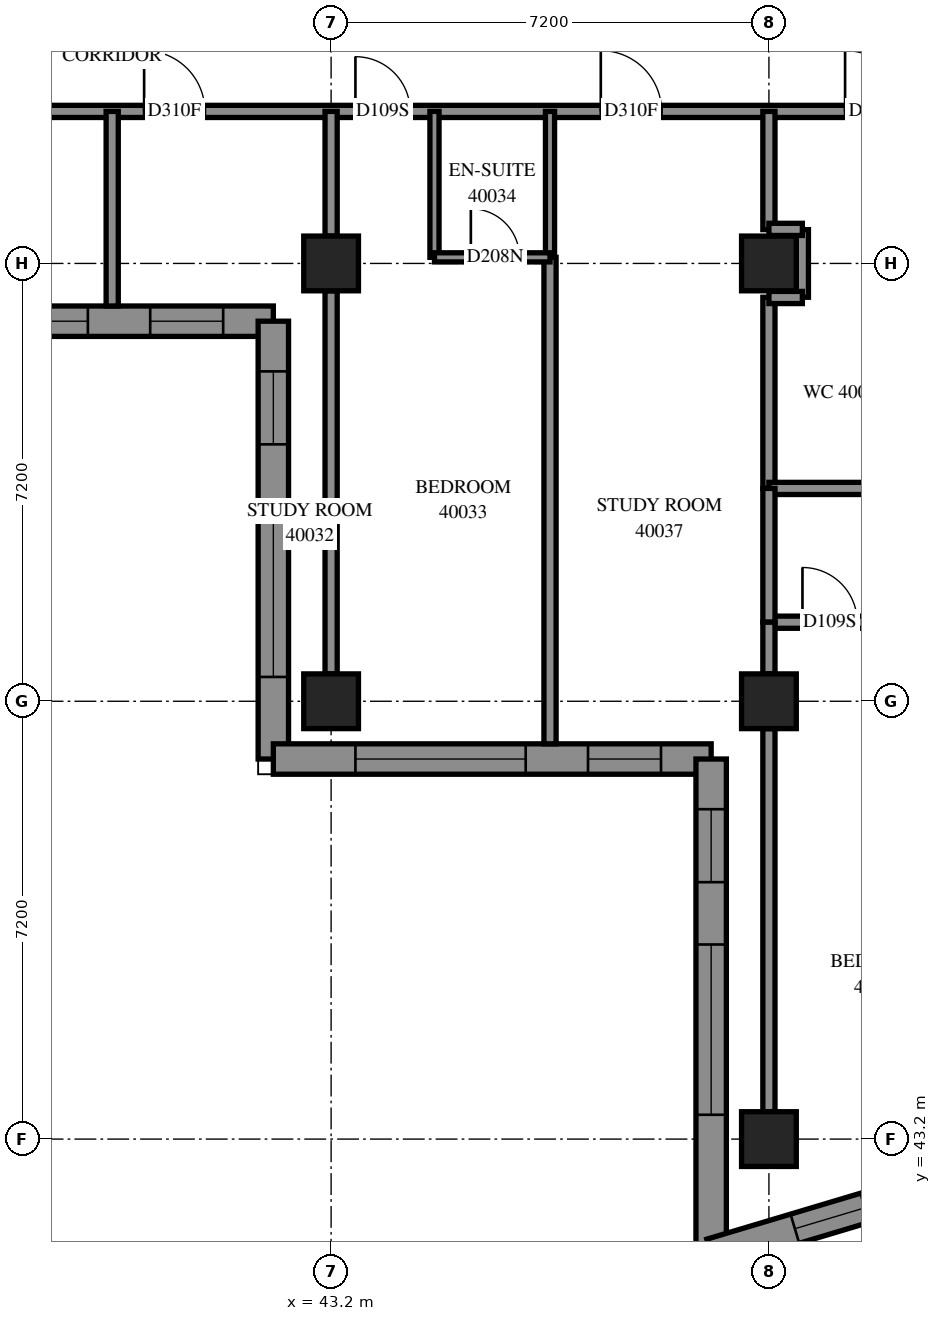
"""IFC4 building model, lengths in metres.
Left out: names, types, materials, properties, quantities, classifications, styles, units other than length and angle.
Written with IfcOpenShell. Run it as: python <this file> out.ifc"""

import sys

from ifc_helpers import new_model, si_unit, direction, frame, frame_2d, origin, origin_2d, place, context, subcontext, project, spatial, polyline, rectangle, outline, extrude, element, fill, save


model = new_model("IFC4")
c1 = context("Model", 3, precision=1e-05, world=origin(), true_north=direction((0.0, 1.0)))
c2 = subcontext(c1, "Body", "Model", "MODEL_VIEW")
j1 = project(units=[si_unit("LENGTHUNIT", "METRE"), si_unit("PLANEANGLEUNIT", "RADIAN")], contexts=[c1])
p1 = place(None, origin())
s1 = spatial("IfcSite", under=j1, at=p1, CompositionType="ELEMENT")
p2 = place(p1, origin())
s2 = spatial("IfcBuilding", under=s1, at=p2, CompositionType="ELEMENT")
p3 = place(p2, frame((0.0, 0.0, 149.0)))
s3 = spatial("IfcBuildingStorey", under=s2, at=p3, CompositionType="ELEMENT", Elevation=149.0)
for number, where, z_axis, x_axis in (
    (1, (43.2, 50.4, 0.0), (0.0, 0.0, 1.0), (1.0, 0.0, 0.0)),
    (2, (43.2, 57.6, 0.0), (0.0, 0.0, 1.0), (1.0, 0.0, 0.0)),
    (3, (50.4, 43.2, 0.0), (0.0, 0.0, 1.0), (1.0, 0.0, 0.0)),
    (4, (50.4, 50.4, 0.0), (0.0, 0.0, 1.0), (1.0, 0.0, 0.0)),
    (5, (50.4, 57.6, 0.0), (0.0, 0.0, 1.0), (1.0, 0.0, 0.0)),
):
    element("IfcColumn", number, at=place(p3, frame(where, z_axis=z_axis, x_axis=x_axis)), inside=s3, PredefinedType="COLUMN", context=c2, shape_type="SweptSolid", body=[
        extrude(rectangle(XDim=0.9, YDim=0.9, at=origin_2d()), origin(), (0.0, 0.0, 1.0), 3.1),
    ])
p4 = place(p3, frame((35.05, 56.65, 0.0), z_axis=(0.0, 0.0, 1.0), x_axis=(1.0, 0.0, 0.0)))
e6 = element("IfcWall", 6, at=p4, inside=s3, PredefinedType="SOLIDWALL", context=c2, shape_type="SweptSolid", body=[
    extrude(outline(polyline([(-0.25, -0.25), (6.95, -0.25), (7.45, 0.25), (0.25, 0.25), (-0.25, -0.25)])), origin(), (0.0, 0.0, 1.0), 3.1),
])
p5 = place(p4, frame((1.35, 0.0, 0.45)))
e7 = element("IfcOpeningElement", 7, at=p5, cuts=e6, PredefinedType="OPENING", context=c2, shape_type="SweptSolid", body=[
    extrude(rectangle(XDim=2.8, YDim=2.5, at=frame_2d((1.4, 1.25))), frame((0.0, 0.26, 0.0), z_axis=(0.0, -1.0, 0.0), x_axis=(1.0, 0.0, 0.0)), (0.0, 0.0, 1.0), 0.52),
])
p6 = place(p4, frame((5.175, 0.0, 0.45)))
e8 = element("IfcOpeningElement", 8, at=p6, cuts=e6, PredefinedType="OPENING", context=c2, shape_type="SweptSolid", body=[
    extrude(rectangle(XDim=1.2, YDim=2.5, at=frame_2d((0.6, 1.25))), frame((0.0, 0.26, 0.0), z_axis=(0.0, -1.0, 0.0), x_axis=(1.0, 0.0, 0.0)), (0.0, 0.0, 1.0), 0.52),
])
p7 = place(p3, frame((42.25, 56.65, 0.0), z_axis=(0.0, 0.0, 1.0), x_axis=(0.0, -1.0, 0.0)))
e9 = element("IfcWall", 9, at=p7, inside=s3, PredefinedType="SOLIDWALL", context=c2, shape_type="SweptSolid", body=[
    extrude(outline(polyline([(0.25, -0.25), (7.45, -0.25), (6.95, 0.25), (-0.25, 0.25), (0.25, -0.25)])), origin(), (0.0, 0.0, 1.0), 3.1),
])
p8 = place(p7, frame((3.05, 0.0, 0.45)))
e10 = element("IfcOpeningElement", 10, at=p8, cuts=e9, PredefinedType="OPENING", context=c2, shape_type="SweptSolid", body=[
    extrude(rectangle(XDim=2.8, YDim=2.5, at=frame_2d((1.4, 1.25))), frame((0.0, 0.26, 0.0), z_axis=(0.0, -1.0, 0.0), x_axis=(1.0, 0.0, 0.0)), (0.0, 0.0, 1.0), 0.52),
])
p9 = place(p7, frame((0.825, 0.0, 0.45)))
e11 = element("IfcOpeningElement", 11, at=p9, cuts=e9, PredefinedType="OPENING", context=c2, shape_type="SweptSolid", body=[
    extrude(rectangle(XDim=1.2, YDim=2.5, at=frame_2d((0.6, 1.25))), frame((0.0, 0.26, 0.0), z_axis=(0.0, -1.0, 0.0), x_axis=(1.0, 0.0, 0.0)), (0.0, 0.0, 1.0), 0.52),
])
p10 = place(p3, frame((42.25, 49.45, 0.0), z_axis=(0.0, 0.0, 1.0), x_axis=(1.0, 0.0, 0.0)))
e12 = element("IfcWall", 12, at=p10, inside=s3, PredefinedType="SOLIDWALL", context=c2, shape_type="SweptSolid", body=[
    extrude(outline(polyline([(-0.25, -0.25), (6.95, -0.25), (7.45, 0.25), (0.25, 0.25), (-0.25, -0.25)])), origin(), (0.0, 0.0, 1.0), 3.1),
])
p11 = place(p10, frame((1.35, 0.0, 0.45)))
e13 = element("IfcOpeningElement", 13, at=p11, cuts=e12, PredefinedType="OPENING", context=c2, shape_type="SweptSolid", body=[
    extrude(rectangle(XDim=2.8, YDim=2.5, at=frame_2d((1.4, 1.25))), frame((0.0, 0.26, 0.0), z_axis=(0.0, -1.0, 0.0), x_axis=(1.0, 0.0, 0.0)), (0.0, 0.0, 1.0), 0.52),
])
p12 = place(p10, frame((5.175, 0.0, 0.45)))
e14 = element("IfcOpeningElement", 14, at=p12, cuts=e12, PredefinedType="OPENING", context=c2, shape_type="SweptSolid", body=[
    extrude(rectangle(XDim=1.2, YDim=2.5, at=frame_2d((0.6, 1.25))), frame((0.0, 0.26, 0.0), z_axis=(0.0, -1.0, 0.0), x_axis=(1.0, 0.0, 0.0)), (0.0, 0.0, 1.0), 0.52),
])
p13 = place(p3, frame((49.45, 49.45, 0.0), z_axis=(0.0, 0.0, 1.0), x_axis=(0.0, -1.0, 0.0)))
e15 = element("IfcWall", 15, at=p13, inside=s3, PredefinedType="SOLIDWALL", context=c2, shape_type="SweptSolid", body=[
    extrude(outline(polyline([(0.25, -0.25), (8.471, -0.25), (7.8, 0.25), (-0.25, 0.25), (0.25, -0.25)])), origin(), (0.0, 0.0, 1.0), 3.1),
])
p14 = place(p13, frame((3.05, 0.0, 0.45)))
e16 = element("IfcOpeningElement", 16, at=p14, cuts=e15, PredefinedType="OPENING", context=c2, shape_type="SweptSolid", body=[
    extrude(rectangle(XDim=2.8, YDim=2.5, at=frame_2d((1.4, 1.25))), frame((0.0, 0.26, 0.0), z_axis=(0.0, -1.0, 0.0), x_axis=(1.0, 0.0, 0.0)), (0.0, 0.0, 1.0), 0.52),
])
p15 = place(p13, frame((0.825, 0.0, 0.45)))
e17 = element("IfcOpeningElement", 17, at=p15, cuts=e15, PredefinedType="OPENING", context=c2, shape_type="SweptSolid", body=[
    extrude(rectangle(XDim=1.2, YDim=2.5, at=frame_2d((0.6, 1.25))), frame((0.0, 0.26, 0.0), z_axis=(0.0, -1.0, 0.0), x_axis=(1.0, 0.0, 0.0)), (0.0, 0.0, 1.0), 0.52),
])
p16 = place(p3, frame((49.45, 41.315, 0.0), z_axis=(0.0, 0.0, 1.0), x_axis=(0.9581326082, 0.2863248246, 0.0)))
e18 = element("IfcWall", 18, at=p16, inside=s3, PredefinedType="SOLIDWALL", context=c2, shape_type="SweptSolid", body=[
    extrude(outline(polyline([(-0.336, -0.25), (3.23, -0.25), (3.335, 0.25), (0.336, 0.25), (-0.336, -0.25)])), origin(), (0.0, 0.0, 1.0), 3.1),
])
p17 = place(p16, frame((1.437, 0.0, 0.45)))
e19 = element("IfcOpeningElement", 19, at=p17, cuts=e18, PredefinedType="OPENING", context=c2, shape_type="SweptSolid", body=[
    extrude(rectangle(XDim=1.2, YDim=2.5, at=frame_2d((0.6, 1.25))), frame((0.0, 0.26, 0.0), z_axis=(0.0, -1.0, 0.0), x_axis=(1.0, 0.0, 0.0)), (0.0, 0.0, 1.0), 0.52),
])
p18 = place(p3, frame((36.0, 60.1, 0.0), z_axis=(0.0, 0.0, 1.0), x_axis=(1.0, 0.0, 0.0)))
e20 = element("IfcWall", 20, at=p18, inside=s3, PredefinedType="PARTITIONING", context=c2, shape_type="SweptSolid", body=[
    extrude(rectangle(XDim=16.9, YDim=0.2, at=frame_2d((8.45, 0.0))), origin(), (0.0, 0.0, 1.0), 3.1),
])
p19 = place(p18, frame((4.125, 0.0, 0.0)))
e21 = element("IfcOpeningElement", 21, at=p19, cuts=e20, PredefinedType="OPENING", context=c2, shape_type="SweptSolid", body=[
    extrude(rectangle(XDim=1.0, YDim=2.1, at=frame_2d((0.5, 1.05))), frame((0.0, 0.11, 0.0), z_axis=(0.0, -1.0, 0.0), x_axis=(1.0, 0.0, 0.0)), (0.0, 0.0, 1.0), 0.22),
])
p20 = place(p18, frame((7.6, 0.0, 0.0)))
e22 = element("IfcOpeningElement", 22, at=p20, cuts=e20, PredefinedType="OPENING", context=c2, shape_type="SweptSolid", body=[
    extrude(rectangle(XDim=0.9, YDim=2.1, at=frame_2d((0.45, 1.05))), frame((0.0, 0.11, 0.0), z_axis=(0.0, -1.0, 0.0), x_axis=(1.0, 0.0, 0.0)), (0.0, 0.0, 1.0), 0.22),
])
p21 = place(p18, frame((11.635, 0.0, 0.0)))
e23 = element("IfcOpeningElement", 23, at=p21, cuts=e20, PredefinedType="OPENING", context=c2, shape_type="SweptSolid", body=[
    extrude(rectangle(XDim=1.0, YDim=2.1, at=frame_2d((0.5, 1.05))), frame((0.0, 0.11, 0.0), z_axis=(0.0, -1.0, 0.0), x_axis=(1.0, 0.0, 0.0)), (0.0, 0.0, 1.0), 0.22),
])
p22 = place(p18, frame((15.652, 0.0, 0.0)))
e24 = element("IfcOpeningElement", 24, at=p22, cuts=e20, PredefinedType="OPENING", context=c2, shape_type="SweptSolid", body=[
    extrude(rectangle(XDim=1.0, YDim=2.1, at=frame_2d((0.5, 1.05))), frame((0.0, 0.11, 0.0), z_axis=(0.0, -1.0, 0.0), x_axis=(1.0, 0.0, 0.0)), (0.0, 0.0, 1.0), 0.22),
])
p23 = place(p3, frame((46.8, 49.7, 0.0), z_axis=(0.0, 0.0, 1.0), x_axis=(0.0, 1.0, 0.0)))
e25 = element("IfcWall", 25, at=p23, inside=s3, PredefinedType="PARTITIONING", context=c2, shape_type="SweptSolid", body=[
    extrude(rectangle(XDim=8.0, YDim=0.2, at=frame_2d((4.0, 0.0))), origin(), (0.0, 0.0, 1.0), 3.1),
])
for number, where, z_axis, x_axis in (
    (26, (50.4, 43.65, 0.0), (0.0, 0.0, 1.0), (0.0, 1.0, 0.0)),
    (27, (43.2, 50.85, 0.0), (0.0, 0.0, 1.0), (0.0, 1.0, 0.0)),
):
    element("IfcWall", number, at=place(p3, frame(where, z_axis=z_axis, x_axis=x_axis)), inside=s3, PredefinedType="PARTITIONING", context=c2, shape_type="SweptSolid", body=[
        extrude(rectangle(XDim=6.3, YDim=0.2, at=frame_2d((3.15, 0.0))), origin(), (0.0, 0.0, 1.0), 2.6),
    ])
p24 = place(p3, frame((50.4, 51.7, 0.0), z_axis=(0.0, 0.0, 1.0), x_axis=(1.0, 0.0, 0.0)))
e28 = element("IfcWall", 28, at=p24, inside=s3, PredefinedType="PARTITIONING", context=c2, shape_type="SweptSolid", body=[
    extrude(rectangle(XDim=5.1, YDim=0.2, at=frame_2d((2.55, 0.0))), origin(), (0.0, 0.0, 1.0), 3.1),
])
p25 = place(p24, frame((0.552, 0.0, 0.0)))
e29 = element("IfcOpeningElement", 29, at=p25, cuts=e28, PredefinedType="OPENING", context=c2, shape_type="SweptSolid", body=[
    extrude(rectangle(XDim=0.9, YDim=2.1, at=frame_2d((0.45, 1.05))), frame((0.0, 0.11, 0.0), z_axis=(0.0, -1.0, 0.0), x_axis=(1.0, 0.0, 0.0)), (0.0, 0.0, 1.0), 0.22),
])
p26 = place(p24, frame((3.976, 0.0, 0.0)))
e30 = element("IfcOpeningElement", 30, at=p26, cuts=e28, PredefinedType="OPENING", context=c2, shape_type="SweptSolid", body=[
    extrude(rectangle(XDim=1.0, YDim=2.1, at=frame_2d((0.5, 1.05))), frame((0.0, 0.11, 0.0), z_axis=(0.0, -1.0, 0.0), x_axis=(1.0, 0.0, 0.0)), (0.0, 0.0, 1.0), 0.22),
])
p27 = place(p3, frame((39.6, 56.9, 0.0), z_axis=(0.0, 0.0, 1.0), x_axis=(0.0, 1.0, 0.0)))
e31 = element("IfcWall", 31, at=p27, inside=s3, PredefinedType="PARTITIONING", context=c2, shape_type="SweptSolid", body=[
    extrude(rectangle(XDim=3.2, YDim=0.2, at=frame_2d((1.6, 0.0))), origin(), (0.0, 0.0, 1.0), 3.1),
])
p28 = place(p3, frame((50.4, 53.9, 0.0), z_axis=(0.0, 0.0, 1.0), x_axis=(0.0, 1.0, 0.0)))
e32 = element("IfcWall", 32, at=p28, inside=s3, PredefinedType="PARTITIONING", context=c2, shape_type="SweptSolid", body=[
    extrude(rectangle(XDim=3.144, YDim=0.2, at=frame_2d((1.572, 0.0))), origin(), (0.0, 0.0, 1.0), 3.1),
])
p29 = place(p3, frame((50.4, 53.9, 0.0), z_axis=(0.0, 0.0, 1.0), x_axis=(1.0, 0.0, 0.0)))
e33 = element("IfcWall", 33, at=p29, inside=s3, PredefinedType="PARTITIONING", context=c2, shape_type="SweptSolid", body=[
    extrude(rectangle(XDim=2.5, YDim=0.2, at=frame_2d((1.25, 0.0))), origin(), (0.0, 0.0, 1.0), 3.1),
])
for number, where, z_axis, x_axis in (
    (34, (44.9, 57.7, 0.0), (0.0, 0.0, 1.0), (0.0, 1.0, 0.0)),
    (35, (46.8, 57.7, 0.0), (0.0, 0.0, 1.0), (0.0, 1.0, 0.0)),
):
    element("IfcWall", number, at=place(p3, frame(where, z_axis=z_axis, x_axis=x_axis)), inside=s3, PredefinedType="PARTITIONING", context=c2, shape_type="SweptSolid", body=[
        extrude(rectangle(XDim=2.4, YDim=0.15, at=frame_2d((1.2, 0.0))), origin(), (0.0, 0.0, 1.0), 3.1),
    ])
p30 = place(p3, frame((50.4, 51.7, 0.0), z_axis=(0.0, 0.0, 1.0), x_axis=(0.0, 1.0, 0.0)))
e36 = element("IfcWall", 36, at=p30, inside=s3, PredefinedType="PARTITIONING", context=c2, shape_type="SweptSolid", body=[
    extrude(rectangle(XDim=2.2, YDim=0.2, at=frame_2d((1.1, 0.0))), origin(), (0.0, 0.0, 1.0), 3.1),
])
p31 = place(p3, frame((43.2, 58.05, 0.0), z_axis=(0.0, 0.0, 1.0), x_axis=(0.0, 1.0, 0.0)))
e37 = element("IfcWall", 37, at=p31, inside=s3, PredefinedType="PARTITIONING", context=c2, shape_type="SweptSolid", body=[
    extrude(rectangle(XDim=2.05, YDim=0.2, at=frame_2d((1.025, 0.0))), origin(), (0.0, 0.0, 1.0), 3.1),
])
p32 = place(p3, frame((50.4, 58.156, 0.0), z_axis=(0.0, 0.0, 1.0), x_axis=(0.0, 1.0, 0.0)))
e38 = element("IfcWall", 38, at=p32, inside=s3, PredefinedType="PARTITIONING", context=c2, shape_type="SweptSolid", body=[
    extrude(rectangle(XDim=1.944, YDim=0.2, at=frame_2d((0.972, 0.0))), origin(), (0.0, 0.0, 1.0), 3.1),
])
p33 = place(p3, frame((44.9, 57.7, 0.0), z_axis=(0.0, 0.0, 1.0), x_axis=(1.0, 0.0, 0.0)))
e39 = element("IfcWall", 39, at=p33, inside=s3, PredefinedType="PARTITIONING", context=c2, shape_type="SweptSolid", body=[
    extrude(rectangle(XDim=1.9, YDim=0.15, at=frame_2d((0.95, 0.0))), origin(), (0.0, 0.0, 1.0), 3.1),
])
p34 = place(p33, frame((0.598, 0.0, 0.0)))
e40 = element("IfcOpeningElement", 40, at=p34, cuts=e39, PredefinedType="OPENING", context=c2, shape_type="SweptSolid", body=[
    extrude(rectangle(XDim=0.8, YDim=2.1, at=frame_2d((0.4, 1.05))), frame((0.0, 0.085, 0.0), z_axis=(0.0, -1.0, 0.0), x_axis=(1.0, 0.0, 0.0)), (0.0, 0.0, 1.0), 0.17),
])
p35 = place(p3, frame((50.95, 57.044, 0.0), z_axis=(0.0, 0.0, 1.0), x_axis=(0.0, 1.0, 0.0)))
e41 = element("IfcWall", 41, at=p35, inside=s3, PredefinedType="PARTITIONING", context=c2, shape_type="SweptSolid", body=[
    extrude(rectangle(XDim=1.112, YDim=0.2, at=frame_2d((0.556, 0.0))), origin(), (0.0, 0.0, 1.0), 3.1),
])
p36 = place(p3, frame((50.4, 50.85, 0.0), z_axis=(0.0, 0.0, 1.0), x_axis=(0.0, 1.0, 0.0)))
e42 = element("IfcWall", 42, at=p36, inside=s3, PredefinedType="PARTITIONING", context=c2, shape_type="SweptSolid", body=[
    extrude(rectangle(XDim=0.85, YDim=0.2, at=frame_2d((0.425, 0.0))), origin(), (0.0, 0.0, 1.0), 3.1),
])
for number, where, z_axis, x_axis in (
    (43, (50.4, 58.16, 0.0), (0.0, 0.0, 1.0), (1.0, 0.0, 0.0)),
    (44, (50.4, 57.04, 0.0), (0.0, 0.0, 1.0), (1.0, 0.0, 0.0)),
):
    element("IfcWall", number, at=place(p3, frame(where, z_axis=z_axis, x_axis=x_axis)), inside=s3, PredefinedType="PARTITIONING", context=c2, shape_type="SweptSolid", body=[
        extrude(rectangle(XDim=0.55, YDim=0.2, at=frame_2d((0.275, 0.0))), origin(), (0.0, 0.0, 1.0), 3.1),
    ])
p37 = place(p5, origin())
e45 = element("IfcWindow", 45, at=p37, inside=s3, PartitioningType="SINGLE_PANEL", PredefinedType="WINDOW", context=c2, shape_type="SweptSolid", body=[
    extrude(rectangle(XDim=2.8, YDim=2.5, at=frame_2d((1.4, 1.25))), frame((0.0, 0.18, 0.0), z_axis=(0.0, -1.0, 0.0), x_axis=(1.0, 0.0, 0.0)), (0.0, 0.0, 1.0), 0.06),
])
fill(e7, e45)
p38 = place(p6, origin())
e46 = element("IfcWindow", 46, at=p38, inside=s3, PartitioningType="SINGLE_PANEL", PredefinedType="WINDOW", context=c2, shape_type="SweptSolid", body=[
    extrude(rectangle(XDim=1.2, YDim=2.5, at=frame_2d((0.6, 1.25))), frame((0.0, 0.18, 0.0), z_axis=(0.0, -1.0, 0.0), x_axis=(1.0, 0.0, 0.0)), (0.0, 0.0, 1.0), 0.06),
])
fill(e8, e46)
p39 = place(p8, origin())
e47 = element("IfcWindow", 47, at=p39, inside=s3, PartitioningType="SINGLE_PANEL", PredefinedType="WINDOW", context=c2, shape_type="SweptSolid", body=[
    extrude(rectangle(XDim=2.8, YDim=2.5, at=frame_2d((1.4, 1.25))), frame((0.0, 0.18, 0.0), z_axis=(0.0, -1.0, 0.0), x_axis=(1.0, 0.0, 0.0)), (0.0, 0.0, 1.0), 0.06),
])
fill(e10, e47)
p40 = place(p9, origin())
e48 = element("IfcWindow", 48, at=p40, inside=s3, PartitioningType="SINGLE_PANEL", PredefinedType="WINDOW", context=c2, shape_type="SweptSolid", body=[
    extrude(rectangle(XDim=1.2, YDim=2.5, at=frame_2d((0.6, 1.25))), frame((0.0, 0.18, 0.0), z_axis=(0.0, -1.0, 0.0), x_axis=(1.0, 0.0, 0.0)), (0.0, 0.0, 1.0), 0.06),
])
fill(e11, e48)
p41 = place(p11, origin())
e49 = element("IfcWindow", 49, at=p41, inside=s3, PartitioningType="SINGLE_PANEL", PredefinedType="WINDOW", context=c2, shape_type="SweptSolid", body=[
    extrude(rectangle(XDim=2.8, YDim=2.5, at=frame_2d((1.4, 1.25))), frame((0.0, 0.18, 0.0), z_axis=(0.0, -1.0, 0.0), x_axis=(1.0, 0.0, 0.0)), (0.0, 0.0, 1.0), 0.06),
])
fill(e13, e49)
p42 = place(p12, origin())
e50 = element("IfcWindow", 50, at=p42, inside=s3, PartitioningType="SINGLE_PANEL", PredefinedType="WINDOW", context=c2, shape_type="SweptSolid", body=[
    extrude(rectangle(XDim=1.2, YDim=2.5, at=frame_2d((0.6, 1.25))), frame((0.0, 0.18, 0.0), z_axis=(0.0, -1.0, 0.0), x_axis=(1.0, 0.0, 0.0)), (0.0, 0.0, 1.0), 0.06),
])
fill(e14, e50)
p43 = place(p14, origin())
e51 = element("IfcWindow", 51, at=p43, inside=s3, PartitioningType="SINGLE_PANEL", PredefinedType="WINDOW", context=c2, shape_type="SweptSolid", body=[
    extrude(rectangle(XDim=2.8, YDim=2.5, at=frame_2d((1.4, 1.25))), frame((0.0, 0.18, 0.0), z_axis=(0.0, -1.0, 0.0), x_axis=(1.0, 0.0, 0.0)), (0.0, 0.0, 1.0), 0.06),
])
fill(e16, e51)
p44 = place(p15, origin())
e52 = element("IfcWindow", 52, at=p44, inside=s3, PartitioningType="SINGLE_PANEL", PredefinedType="WINDOW", context=c2, shape_type="SweptSolid", body=[
    extrude(rectangle(XDim=1.2, YDim=2.5, at=frame_2d((0.6, 1.25))), frame((0.0, 0.18, 0.0), z_axis=(0.0, -1.0, 0.0), x_axis=(1.0, 0.0, 0.0)), (0.0, 0.0, 1.0), 0.06),
])
fill(e17, e52)
p45 = place(p17, origin())
e53 = element("IfcWindow", 53, at=p45, inside=s3, PartitioningType="SINGLE_PANEL", PredefinedType="WINDOW", context=c2, shape_type="SweptSolid", body=[
    extrude(rectangle(XDim=1.2, YDim=2.5, at=frame_2d((0.6, 1.25))), frame((0.0, 0.18, 0.0), z_axis=(0.0, -1.0, 0.0), x_axis=(1.0, 0.0, 0.0)), (0.0, 0.0, 1.0), 0.06),
])
fill(e19, e53)
p46 = place(p19, origin())
e54 = element("IfcDoor", 54, at=p46, inside=s3, OperationType="SINGLE_SWING_RIGHT", PredefinedType="DOOR", context=c2, shape_type="SweptSolid", body=[
    extrude(rectangle(XDim=1.0, YDim=2.1, at=frame_2d((0.5, 1.05))), frame((0.0, 0.025, 0.0), z_axis=(0.0, -1.0, 0.0), x_axis=(1.0, 0.0, 0.0)), (0.0, 0.0, 1.0), 0.05),
])
fill(e21, e54)
p47 = place(p20, origin())
e55 = element("IfcDoor", 55, at=p47, inside=s3, OperationType="SINGLE_SWING_LEFT", PredefinedType="DOOR", context=c2, shape_type="SweptSolid", body=[
    extrude(rectangle(XDim=0.9, YDim=2.1, at=frame_2d((0.45, 1.05))), frame((0.0, 0.025, 0.0), z_axis=(0.0, -1.0, 0.0), x_axis=(1.0, 0.0, 0.0)), (0.0, 0.0, 1.0), 0.05),
])
fill(e22, e55)
p48 = place(p34, origin())
e56 = element("IfcDoor", 56, at=p48, inside=s3, OperationType="SINGLE_SWING_RIGHT", PredefinedType="DOOR", context=c2, shape_type="SweptSolid", body=[
    extrude(rectangle(XDim=0.8, YDim=2.1, at=frame_2d((0.4, 1.05))), frame((0.0, 0.025, 0.0), z_axis=(0.0, -1.0, 0.0), x_axis=(1.0, 0.0, 0.0)), (0.0, 0.0, 1.0), 0.05),
])
fill(e40, e56)
p49 = place(p21, origin())
e57 = element("IfcDoor", 57, at=p49, inside=s3, OperationType="SINGLE_SWING_RIGHT", PredefinedType="DOOR", context=c2, shape_type="SweptSolid", body=[
    extrude(rectangle(XDim=1.0, YDim=2.1, at=frame_2d((0.5, 1.05))), frame((0.0, 0.025, 0.0), z_axis=(0.0, -1.0, 0.0), x_axis=(1.0, 0.0, 0.0)), (0.0, 0.0, 1.0), 0.05),
])
fill(e23, e57)
p50 = place(p22, origin())
e58 = element("IfcDoor", 58, at=p50, inside=s3, OperationType="SINGLE_SWING_LEFT", PredefinedType="DOOR", context=c2, shape_type="SweptSolid", body=[
    extrude(rectangle(XDim=1.0, YDim=2.1, at=frame_2d((0.5, 1.05))), frame((0.0, 0.025, 0.0), z_axis=(0.0, -1.0, 0.0), x_axis=(1.0, 0.0, 0.0)), (0.0, 0.0, 1.0), 0.05),
])
fill(e24, e58)
p51 = place(p25, origin())
e59 = element("IfcDoor", 59, at=p51, inside=s3, OperationType="SINGLE_SWING_LEFT", PredefinedType="DOOR", context=c2, shape_type="SweptSolid", body=[
    extrude(rectangle(XDim=0.9, YDim=2.1, at=frame_2d((0.45, 1.05))), frame((0.0, 0.025, 0.0), z_axis=(0.0, -1.0, 0.0), x_axis=(1.0, 0.0, 0.0)), (0.0, 0.0, 1.0), 0.05),
])
fill(e29, e59)
save(model, sys.argv[1])
